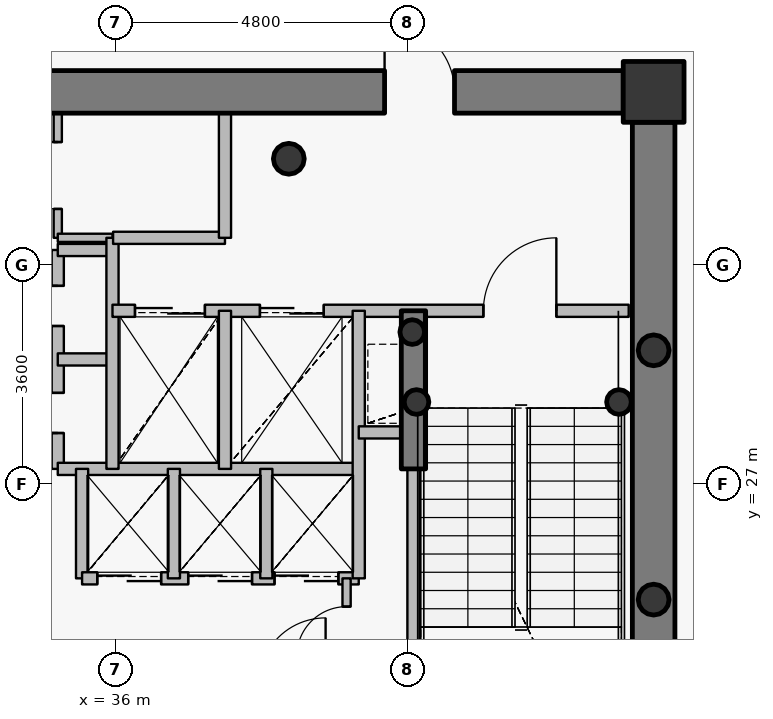
"""IFC4 building model, lengths in metres.
Left out: names, types, materials, properties, quantities, classifications, styles, units other than length and angle.
Written with IfcOpenShell. Run it as: python <this file> out.ifc"""

import sys

from ifc_helpers import new_model, si_unit, direction, frame, frame_2d, origin, origin_2d, place, context, subcontext, project, spatial, rectangle, hollow_circle, extrude, source, transform, mapped, element, fill, save


model = new_model("IFC4")
c1 = context("Model", 3, precision=1e-05, world=origin(), true_north=direction((0.0, 1.0)))
c2 = subcontext(c1, "Body", "Model", "MODEL_VIEW")
j1 = project(units=[si_unit("LENGTHUNIT", "METRE"), si_unit("PLANEANGLEUNIT", "RADIAN")], contexts=[c1])
p1 = place(None, origin())
s1 = spatial("IfcSite", under=j1, at=p1, CompositionType="ELEMENT")
p2 = place(p1, origin())
s2 = spatial("IfcBuilding", under=s1, at=p2, CompositionType="ELEMENT")
p3 = place(p2, frame((0.0, 0.0, 280.5)))
s3 = spatial("IfcBuildingStorey", under=s2, at=p3, CompositionType="ELEMENT", Elevation=280.5)
p4 = place(p3, frame((44.85, 33.45, 0.0), z_axis=(0.0, 0.0, 1.0), x_axis=(1.0, 0.0, 0.0)))
e1 = element("IfcColumn", 1, at=p4, inside=s3, PredefinedType="COLUMN", context=c2, shape_type="SweptSolid", body=[
    extrude(rectangle(XDim=1.0, YDim=1.0, at=origin_2d()), origin(), (0.0, 0.0, 1.0), 3.75),
])
p5 = place(p3, frame((38.85, 32.35, 0.0), z_axis=(0.0, 0.0, 1.0), x_axis=(1.0, 0.0, 0.0)))
e2 = element("IfcColumn", 2, at=p5, inside=s3, PredefinedType="COLUMN", context=c2, shape_type="SweptSolid", body=[
    extrude(hollow_circle(Radius=0.254, WallThickness=0.02, at=origin_2d()), origin(), (0.0, 0.0, 1.0), 3.75),
])
for number, where, z_axis, x_axis in (
    (3, (40.95, 28.35, 0.0), (0.0, 0.0, 1.0), (1.0, 0.0, 0.0)),
    (4, (44.28, 28.35, 0.0), (0.0, 0.0, 1.0), (1.0, 0.0, 0.0)),
    (5, (40.88, 29.5, 0.0), (0.0, 0.0, 1.0), (1.0, 0.0, 0.0)),
):
    element("IfcColumn", number, at=place(p3, frame(where, z_axis=z_axis, x_axis=x_axis)), inside=s3, PredefinedType="COLUMN", context=c2, shape_type="SweptSolid", body=[
        extrude(hollow_circle(Radius=0.203, WallThickness=0.016, at=origin_2d()), origin(), (0.0, 0.0, 1.0), 3.75),
    ])
p6 = place(p3, frame((27.65, 33.45, 0.0), z_axis=(0.0, 0.0, 1.0), x_axis=(1.0, 0.0, 0.0)))
e6 = element("IfcWall", 6, at=p6, inside=s3, PredefinedType="SHEAR", context=c2, shape_type="SweptSolid", body=[
    extrude(rectangle(XDim=16.7, YDim=0.7, at=frame_2d((8.35, 0.0))), origin(), (0.0, 0.0, 1.0), 3.05),
])
p7 = place(p6, frame((12.775, 0.0, 0.0)))
e7 = element("IfcOpeningElement", 7, at=p7, cuts=e6, PredefinedType="OPENING", context=c2, shape_type="SweptSolid", body=[
    extrude(rectangle(XDim=1.15, YDim=2.15, at=origin_2d()), frame((0.575, 0.36, 1.075), z_axis=(0.0, -1.0, 0.0), x_axis=(1.0, 0.0, 0.0)), (0.0, 0.0, 1.0), 0.72),
])
p8 = place(p3, frame((44.85, 32.95, 0.0), z_axis=(0.0, 0.0, 1.0), x_axis=(0.0, -1.0, 0.0)))
e8 = element("IfcWall", 8, at=p8, inside=s3, PredefinedType="SHEAR", context=c2, shape_type="SweptSolid", body=[
    extrude(rectangle(XDim=11.9, YDim=0.7, at=frame_2d((5.95, 0.0))), origin(), (0.0, 0.0, 1.0), 3.05),
])
p9 = place(p3, frame((40.9, 27.25, 0.0), z_axis=(0.0, 0.0, 1.0), x_axis=(0.0, 1.0, 0.0)))
e9 = element("IfcWall", 9, at=p9, inside=s3, PredefinedType="SHEAR", context=c2, shape_type="SweptSolid", body=[
    extrude(rectangle(XDim=2.6, YDim=0.4, at=frame_2d((1.3, 0.0))), origin(), (0.0, 0.0, 1.0), 3.1),
])
for number, where, z_axis, x_axis in (
    (10, (44.85, 25.1, 0.0), (0.0, 0.0, 1.0), (1.0, 0.0, 0.0)),
    (11, (44.85, 29.2, 0.0), (0.0, 0.0, 1.0), (1.0, 0.0, 0.0)),
):
    element("IfcColumn", number, at=place(p3, frame(where, z_axis=z_axis, x_axis=x_axis)), inside=s3, PredefinedType="COLUMN", context=c2, shape_type="SweptSolid", body=[
        extrude(hollow_circle(Radius=0.254, WallThickness=0.02, at=origin_2d()), origin(), (0.0, 0.0, 1.0), 3.75),
    ])
p10 = place(p3, frame((35.05, 27.25, 0.0), z_axis=(0.0, 0.0, 1.0), x_axis=(0.0, 1.0, 0.0)))
e12 = element("IfcWall", 12, at=p10, inside=s3, PredefinedType="PARTITIONING", context=c2, shape_type="SweptSolid", body=[
    extrude(rectangle(XDim=3.6, YDim=0.2, at=frame_2d((1.8, 0.0))), origin(), (0.0, 0.0, 1.0), 3.5),
])
p11 = place(p10, frame((0.59, 0.0, 0.0)))
e13 = element("IfcOpeningElement", 13, at=p11, cuts=e12, PredefinedType="OPENING", context=c2, shape_type="SweptSolid", body=[
    extrude(rectangle(XDim=0.66, YDim=2.05, at=origin_2d()), frame((0.33, 0.11, 1.025), z_axis=(0.0, -1.0, 0.0), x_axis=(1.0, 0.0, 0.0)), (0.0, 0.0, 1.0), 0.22),
])
p12 = place(p10, frame((2.35, 0.0, 0.0)))
e14 = element("IfcOpeningElement", 14, at=p12, cuts=e12, PredefinedType="OPENING", context=c2, shape_type="SweptSolid", body=[
    extrude(rectangle(XDim=0.66, YDim=2.05, at=origin_2d()), frame((0.33, 0.11, 1.025), z_axis=(0.0, -1.0, 0.0), x_axis=(1.0, 0.0, 0.0)), (0.0, 0.0, 1.0), 0.22),
])
p13 = place(p3, frame((35.05, 27.25, 0.0), z_axis=(0.0, 0.0, 1.0), x_axis=(1.0, 0.0, 0.0)))
e15 = element("IfcWall", 15, at=p13, inside=s3, PredefinedType="PARTITIONING", context=c2, shape_type="SweptSolid", body=[
    extrude(rectangle(XDim=4.95, YDim=0.2, at=frame_2d((2.475, 0.0))), origin(), (0.0, 0.0, 1.0), 3.085),
])
for number, where, z_axis, x_axis in (
    (16, (35.05, 29.05, 0.0), (0.0, 0.0, 1.0), (1.0, 0.0, 0.0)),
    (17, (35.05, 30.85, 0.0), (0.0, 0.0, 1.0), (1.0, 0.0, 0.0)),
):
    element("IfcWall", number, at=place(p3, frame(where, z_axis=z_axis, x_axis=x_axis)), inside=s3, PredefinedType="PARTITIONING", context=c2, shape_type="SweptSolid", body=[
        extrude(rectangle(XDim=0.9, YDim=0.2, at=frame_2d((0.45, 0.0))), origin(), (0.0, 0.0, 1.0), 3.5),
    ])
p14 = place(p3, frame((35.05, 31.05, 0.0), z_axis=(0.0, 0.0, 1.0), x_axis=(0.0, 1.0, 0.0)))
e18 = element("IfcWall", 18, at=p14, inside=s3, PredefinedType="PARTITIONING", context=c2, shape_type="SweptSolid", body=[
    extrude(rectangle(XDim=2.05, YDim=0.135, at=frame_2d((1.025, 0.0))), origin(), (0.0, 0.0, 1.0), 3.085),
])
p15 = place(p14, frame((0.475, 0.0, 0.0)))
e19 = element("IfcOpeningElement", 19, at=p15, cuts=e18, PredefinedType="OPENING", context=c2, shape_type="SweptSolid", body=[
    extrude(rectangle(XDim=1.1, YDim=2.15, at=origin_2d()), frame((0.55, 0.078, 1.075), z_axis=(0.0, -1.0, 0.0), x_axis=(1.0, 0.0, 0.0)), (0.0, 0.0, 1.0), 0.155),
])
p16 = place(p3, frame((35.05, 31.05, 0.0), z_axis=(0.0, 0.0, 1.0), x_axis=(1.0, 0.0, 0.0)))
e20 = element("IfcWall", 20, at=p16, inside=s3, PredefinedType="PARTITIONING", context=c2, shape_type="SweptSolid", body=[
    extrude(rectangle(XDim=0.9, YDim=0.135, at=frame_2d((0.45, 0.0))), origin(), (0.0, 0.0, 1.0), 3.5),
])
p17 = place(p3, frame((35.45, 25.45, 0.0), z_axis=(0.0, 0.0, 1.0), x_axis=(0.0, 1.0, 0.0)))
e21 = element("IfcWall", 21, at=p17, inside=s3, PredefinedType="PARTITIONING", context=c2, shape_type="SweptSolid", body=[
    extrude(rectangle(XDim=1.8, YDim=0.2, at=frame_2d((0.9, 0.0))), origin(), (0.0, 0.0, 1.0), 3.5),
])
p18 = place(p3, frame((35.45, 25.45, 0.0), z_axis=(0.0, 0.0, 1.0), x_axis=(1.0, 0.0, 0.0)))
e22 = element("IfcWall", 22, at=p18, inside=s3, PredefinedType="PARTITIONING", context=c2, shape_type="SweptSolid", body=[
    extrude(rectangle(XDim=4.55, YDim=0.2, at=frame_2d((2.275, 0.0))), origin(), (0.0, 0.0, 1.0), 3.085),
])
p19 = place(p18, frame((0.25, 0.0, 0.0)))
e23 = element("IfcOpeningElement", 23, at=p19, cuts=e22, PredefinedType="OPENING", context=c2, shape_type="SweptSolid", body=[
    extrude(rectangle(XDim=1.05, YDim=2.15, at=origin_2d()), frame((0.525, 0.11, 1.075), z_axis=(0.0, -1.0, 0.0), x_axis=(1.0, 0.0, 0.0)), (0.0, 0.0, 1.0), 0.22),
])
p20 = place(p18, frame((1.745, 0.0, 0.0)))
e24 = element("IfcOpeningElement", 24, at=p20, cuts=e22, PredefinedType="OPENING", context=c2, shape_type="SweptSolid", body=[
    extrude(rectangle(XDim=1.05, YDim=2.15, at=origin_2d()), frame((0.525, 0.11, 1.075), z_axis=(0.0, -1.0, 0.0), x_axis=(1.0, 0.0, 0.0)), (0.0, 0.0, 1.0), 0.22),
])
p21 = place(p18, frame((3.165, 0.0, 0.0)))
e25 = element("IfcOpeningElement", 25, at=p21, cuts=e22, PredefinedType="OPENING", context=c2, shape_type="SweptSolid", body=[
    extrude(rectangle(XDim=1.05, YDim=2.15, at=origin_2d()), frame((0.525, 0.11, 1.075), z_axis=(0.0, -1.0, 0.0), x_axis=(1.0, 0.0, 0.0)), (0.0, 0.0, 1.0), 0.22),
])
p22 = place(p3, frame((35.95, 27.25, 0.0), z_axis=(0.0, 0.0, 1.0), x_axis=(0.0, 1.0, 0.0)))
e26 = element("IfcWall", 26, at=p22, inside=s3, PredefinedType="PARTITIONING", context=c2, shape_type="SweptSolid", body=[
    extrude(rectangle(XDim=3.8, YDim=0.2, at=frame_2d((1.9, 0.0))), origin(), (0.0, 0.0, 1.0), 3.5),
])
p23 = place(p3, frame((35.95, 29.85, 0.0), z_axis=(0.0, 0.0, 1.0), x_axis=(1.0, 0.0, 0.0)))
e27 = element("IfcWall", 27, at=p23, inside=s3, PredefinedType="PARTITIONING", context=c2, shape_type="SweptSolid", body=[
    extrude(rectangle(XDim=8.49, YDim=0.2, at=frame_2d((4.245, 0.0))), origin(), (0.0, 0.0, 1.0), 3.085),
])
p24 = place(p23, frame((6.1, 0.0, 0.0)))
e28 = element("IfcOpeningElement", 28, at=p24, cuts=e27, PredefinedType="OPENING", context=c2, shape_type="SweptSolid", body=[
    extrude(rectangle(XDim=1.2, YDim=2.15, at=origin_2d()), frame((0.6, 0.11, 1.075), z_axis=(0.0, -1.0, 0.0), x_axis=(1.0, 0.0, 0.0)), (0.0, 0.0, 1.0), 0.22),
])
p25 = place(p23, frame((0.37, 0.0, 0.0)))
e29 = element("IfcOpeningElement", 29, at=p25, cuts=e27, PredefinedType="OPENING", context=c2, shape_type="SweptSolid", body=[
    extrude(rectangle(XDim=1.15, YDim=2.15, at=origin_2d()), frame((0.575, 0.11, 1.075), z_axis=(0.0, -1.0, 0.0), x_axis=(1.0, 0.0, 0.0)), (0.0, 0.0, 1.0), 0.22),
])
p26 = place(p23, frame((2.425, 0.0, 0.0)))
e30 = element("IfcOpeningElement", 30, at=p26, cuts=e27, PredefinedType="OPENING", context=c2, shape_type="SweptSolid", body=[
    extrude(rectangle(XDim=1.05, YDim=2.15, at=origin_2d()), frame((0.525, 0.11, 1.075), z_axis=(0.0, -1.0, 0.0), x_axis=(1.0, 0.0, 0.0)), (0.0, 0.0, 1.0), 0.22),
])
p27 = place(p3, frame((35.96, 31.05, 0.0), z_axis=(0.0, 0.0, 1.0), x_axis=(1.0, 0.0, 0.0)))
e31 = element("IfcWall", 31, at=p27, inside=s3, PredefinedType="PARTITIONING", context=c2, shape_type="SweptSolid", body=[
    extrude(rectangle(XDim=1.84, YDim=0.2, at=frame_2d((0.92, 0.0))), origin(), (0.0, 0.0, 1.0), 3.5),
])
p28 = place(p3, frame((36.96, 25.45, 0.0), z_axis=(0.0, 0.0, 1.0), x_axis=(0.0, 1.0, 0.0)))
e32 = element("IfcWall", 32, at=p28, inside=s3, PredefinedType="PARTITIONING", context=c2, shape_type="SweptSolid", body=[
    extrude(rectangle(XDim=1.8, YDim=0.2, at=frame_2d((0.9, 0.0))), origin(), (0.0, 0.0, 1.0), 3.5),
])
p29 = place(p3, frame((37.8, 27.25, 0.0), z_axis=(0.0, 0.0, 1.0), x_axis=(0.0, 1.0, 0.0)))
e33 = element("IfcWall", 33, at=p29, inside=s3, PredefinedType="PARTITIONING", context=c2, shape_type="SweptSolid", body=[
    extrude(rectangle(XDim=2.6, YDim=0.2, at=frame_2d((1.3, 0.0))), origin(), (0.0, 0.0, 1.0), 3.5),
])
p30 = place(p3, frame((37.8, 31.05, 0.0), z_axis=(0.0, 0.0, 1.0), x_axis=(0.0, 1.0, 0.0)))
e34 = element("IfcWall", 34, at=p30, inside=s3, PredefinedType="PARTITIONING", context=c2, shape_type="SweptSolid", body=[
    extrude(rectangle(XDim=2.05, YDim=0.2, at=frame_2d((1.025, 0.0))), origin(), (0.0, 0.0, 1.0), 3.085),
])
p31 = place(p3, frame((38.48, 25.45, 0.0), z_axis=(0.0, 0.0, 1.0), x_axis=(0.0, 1.0, 0.0)))
e35 = element("IfcWall", 35, at=p31, inside=s3, PredefinedType="PARTITIONING", context=c2, shape_type="SweptSolid", body=[
    extrude(rectangle(XDim=1.8, YDim=0.2, at=frame_2d((0.9, 0.0))), origin(), (0.0, 0.0, 1.0), 3.5),
])
p32 = place(p3, frame((39.8, 23.7, 0.0), z_axis=(0.0, 0.0, 1.0), x_axis=(0.0, 1.0, 0.0)))
e36 = element("IfcWall", 36, at=p32, inside=s3, PredefinedType="PARTITIONING", context=c2, shape_type="SweptSolid", body=[
    extrude(rectangle(XDim=1.75, YDim=0.135, at=frame_2d((0.875, 0.0))), origin(), (0.0, 0.0, 1.0), 3.5),
])
p33 = place(p32, frame((0.465, 0.0, 0.0)))
e37 = element("IfcOpeningElement", 37, at=p33, cuts=e36, PredefinedType="OPENING", context=c2, shape_type="SweptSolid", body=[
    extrude(rectangle(XDim=0.82, YDim=2.1, at=origin_2d()), frame((0.41, 0.078, 1.05), z_axis=(0.0, -1.0, 0.0), x_axis=(1.0, 0.0, 0.0)), (0.0, 0.0, 1.0), 0.155),
])
p34 = place(p3, frame((40.0, 25.45, 0.0), z_axis=(0.0, 0.0, 1.0), x_axis=(0.0, 1.0, 0.0)))
e38 = element("IfcWall", 38, at=p34, inside=s3, PredefinedType="PARTITIONING", context=c2, shape_type="SweptSolid", body=[
    extrude(rectangle(XDim=4.4, YDim=0.2, at=frame_2d((2.2, 0.0))), origin(), (0.0, 0.0, 1.0), 3.5),
])
p35 = place(p3, frame((40.0, 27.85, 0.0), z_axis=(0.0, 0.0, 1.0), x_axis=(1.0, 0.0, 0.0)))
e39 = element("IfcWall", 39, at=p35, inside=s3, PredefinedType="PARTITIONING", context=c2, shape_type="SweptSolid", body=[
    extrude(rectangle(XDim=0.9, YDim=0.2, at=frame_2d((0.45, 0.0))), origin(), (0.0, 0.0, 1.0), 3.5),
])
p36 = place(p3, frame((40.9, 21.33, 0.0), z_axis=(0.0, 0.0, 1.0), x_axis=(0.0, 1.0, 0.0)))
e40 = element("IfcWall", 40, at=p36, inside=s3, PredefinedType="PARTITIONING", context=c2, shape_type="SweptSolid", body=[
    extrude(rectangle(XDim=5.91, YDim=0.2, at=frame_2d((2.955, 0.0))), origin(), (0.0, 0.0, 1.0), 3.035),
])
p37 = place(p3, frame((45.2, 33.8, 0.0), z_axis=(0.0, 0.0, 1.0), x_axis=(-1.0, 0.0, 0.0)))
e41 = element("IfcWall", 41, at=p37, inside=s3, PredefinedType="PARTITIONING", context=c2, shape_type="SweptSolid", body=[
    extrude(rectangle(XDim=0.84, YDim=0.135, at=frame_2d((0.42, 0.0))), origin(), (0.0, 0.0, 1.0), 3.035),
])
p38 = place(p3, frame((45.2, 32.96, 0.0), z_axis=(0.0, 0.0, 1.0), x_axis=(0.0, 1.0, 0.0)))
e42 = element("IfcWall", 42, at=p38, inside=s3, PredefinedType="PARTITIONING", context=c2, shape_type="SweptSolid", body=[
    extrude(rectangle(XDim=0.532, YDim=0.135, at=frame_2d((0.266, 0.0))), origin(), (0.0, 0.0, 1.0), 3.5),
])
m1 = source(origin(), c2, "Body", "SweptSolid", [
    extrude(rectangle(XDim=1.15, YDim=2.15, at=origin_2d()), frame((0.575, 0.025, 1.075), z_axis=(0.0, -1.0, 0.0), x_axis=(1.0, 0.0, 0.0)), (0.0, 0.0, 1.0), 0.05),
])
p39 = place(p7, origin())
e43 = element("IfcDoor", 43, at=p39, inside=s3, OperationType="SINGLE_SWING_LEFT", PredefinedType="DOOR", context=c2, shape_type="MappedRepresentation", body=[
    mapped(m1, transform((0.0, 0.0, 0.0), x_axis=(1.0, 0.0, 0.0), y_axis=(0.0, 1.0, 0.0), z_axis=(0.0, 0.0, 1.0), scale=1.0)),
])
fill(e7, e43)
m2 = source(origin(), c2, "Body", "SweptSolid", [
    extrude(rectangle(XDim=1.2, YDim=2.15, at=origin_2d()), frame((0.6, 0.025, 1.075), z_axis=(0.0, -1.0, 0.0), x_axis=(1.0, 0.0, 0.0)), (0.0, 0.0, 1.0), 0.05),
])
p40 = place(p24, origin())
e44 = element("IfcDoor", 44, at=p40, inside=s3, OperationType="SINGLE_SWING_RIGHT", PredefinedType="DOOR", context=c2, shape_type="MappedRepresentation", body=[
    mapped(m2, transform((0.0, 0.0, 0.0), x_axis=(1.0, 0.0, 0.0), y_axis=(0.0, 1.0, 0.0), z_axis=(0.0, 0.0, 1.0), scale=1.0)),
])
fill(e28, e44)
m3 = source(origin(), c2, "Body", "SweptSolid", [
    extrude(rectangle(XDim=1.15, YDim=2.15, at=origin_2d()), frame((0.575, 0.025, 1.075), z_axis=(0.0, -1.0, 0.0), x_axis=(1.0, 0.0, 0.0)), (0.0, 0.0, 1.0), 0.05),
])
p41 = place(p25, origin())
e45 = element("IfcDoor", 45, at=p41, inside=s3, OperationType="DOUBLE_DOOR_SLIDING", PredefinedType="USERDEFINED", context=c2, shape_type="MappedRepresentation", body=[
    mapped(m3, transform((0.0, 0.0, 0.0), x_axis=(1.0, 0.0, 0.0), y_axis=(0.0, 1.0, 0.0), z_axis=(0.0, 0.0, 1.0), scale=1.0)),
])
fill(e29, e45)
m4 = source(origin(), c2, "Body", "SweptSolid", [
    extrude(rectangle(XDim=1.05, YDim=2.15, at=origin_2d()), frame((0.525, 0.025, 1.075), z_axis=(0.0, -1.0, 0.0), x_axis=(1.0, 0.0, 0.0)), (0.0, 0.0, 1.0), 0.05),
])
p42 = place(p26, origin())
e46 = element("IfcDoor", 46, at=p42, inside=s3, OperationType="DOUBLE_DOOR_SLIDING", PredefinedType="USERDEFINED", context=c2, shape_type="MappedRepresentation", body=[
    mapped(m4, transform((0.0, 0.0, 0.0), x_axis=(1.0, 0.0, 0.0), y_axis=(0.0, 1.0, 0.0), z_axis=(0.0, 0.0, 1.0), scale=1.0)),
])
fill(e30, e46)
p43 = place(p19, origin())
e47 = element("IfcDoor", 47, at=p43, inside=s3, OperationType="DOUBLE_DOOR_SLIDING", PredefinedType="USERDEFINED", context=c2, shape_type="MappedRepresentation", body=[
    mapped(m4, transform((0.0, 0.0, 0.0), x_axis=(1.0, 0.0, 0.0), y_axis=(0.0, 1.0, 0.0), z_axis=(0.0, 0.0, 1.0), scale=1.0)),
])
fill(e23, e47)
p44 = place(p20, origin())
e48 = element("IfcDoor", 48, at=p44, inside=s3, OperationType="DOUBLE_DOOR_SLIDING", PredefinedType="USERDEFINED", context=c2, shape_type="MappedRepresentation", body=[
    mapped(m4, transform((0.0, 0.0, 0.0), x_axis=(1.0, 0.0, 0.0), y_axis=(0.0, 1.0, 0.0), z_axis=(0.0, 0.0, 1.0), scale=1.0)),
])
fill(e24, e48)
p45 = place(p21, origin())
e49 = element("IfcDoor", 49, at=p45, inside=s3, OperationType="DOUBLE_DOOR_SLIDING", PredefinedType="USERDEFINED", context=c2, shape_type="MappedRepresentation", body=[
    mapped(m4, transform((0.0, 0.0, 0.0), x_axis=(1.0, 0.0, 0.0), y_axis=(0.0, 1.0, 0.0), z_axis=(0.0, 0.0, 1.0), scale=1.0)),
])
fill(e25, e49)
m5 = source(origin(), c2, "Body", "SweptSolid", [
    extrude(rectangle(XDim=0.66, YDim=2.05, at=origin_2d()), frame((0.33, 0.025, 1.025), z_axis=(0.0, -1.0, 0.0), x_axis=(1.0, 0.0, 0.0)), (0.0, 0.0, 1.0), 0.05),
])
p46 = place(p11, origin())
e50 = element("IfcDoor", 50, at=p46, inside=s3, OperationType="SINGLE_SWING_LEFT", PredefinedType="USERDEFINED", context=c2, shape_type="MappedRepresentation", body=[
    mapped(m5, transform((0.0, 0.0, 0.0), x_axis=(1.0, 0.0, 0.0), y_axis=(0.0, 1.0, 0.0), z_axis=(0.0, 0.0, 1.0), scale=1.0)),
])
fill(e13, e50)
p47 = place(p12, origin())
e51 = element("IfcDoor", 51, at=p47, inside=s3, OperationType="SINGLE_SWING_RIGHT", PredefinedType="USERDEFINED", context=c2, shape_type="MappedRepresentation", body=[
    mapped(m5, transform((0.0, 0.0, 0.0), x_axis=(1.0, 0.0, 0.0), y_axis=(0.0, 1.0, 0.0), z_axis=(0.0, 0.0, 1.0), scale=1.0)),
])
fill(e14, e51)
m6 = source(origin(), c2, "Body", "SweptSolid", [
    extrude(rectangle(XDim=1.1, YDim=2.15, at=origin_2d()), frame((0.55, 0.025, 1.075), z_axis=(0.0, -1.0, 0.0), x_axis=(1.0, 0.0, 0.0)), (0.0, 0.0, 1.0), 0.05),
])
p48 = place(p15, origin())
e52 = element("IfcDoor", 52, at=p48, inside=s3, OperationType="SINGLE_SWING_RIGHT", PredefinedType="DOOR", context=c2, shape_type="MappedRepresentation", body=[
    mapped(m6, transform((0.0, 0.0, 0.0), x_axis=(1.0, 0.0, 0.0), y_axis=(0.0, 1.0, 0.0), z_axis=(0.0, 0.0, 1.0), scale=1.0)),
])
fill(e19, e52)
m7 = source(origin(), c2, "Body", "SweptSolid", [
    extrude(rectangle(XDim=0.82, YDim=2.1, at=origin_2d()), frame((0.41, 0.025, 1.05), z_axis=(0.0, -1.0, 0.0), x_axis=(1.0, 0.0, 0.0)), (0.0, 0.0, 1.0), 0.05),
])
p49 = place(p33, origin())
e53 = element("IfcDoor", 53, at=p49, inside=s3, OperationType="SINGLE_SWING_LEFT", PredefinedType="DOOR", context=c2, shape_type="MappedRepresentation", body=[
    mapped(m7, transform((0.0, 0.0, 0.0), x_axis=(1.0, 0.0, 0.0), y_axis=(0.0, 1.0, 0.0), z_axis=(0.0, 0.0, 1.0), scale=1.0)),
])
fill(e37, e53)
save(model, sys.argv[1])
